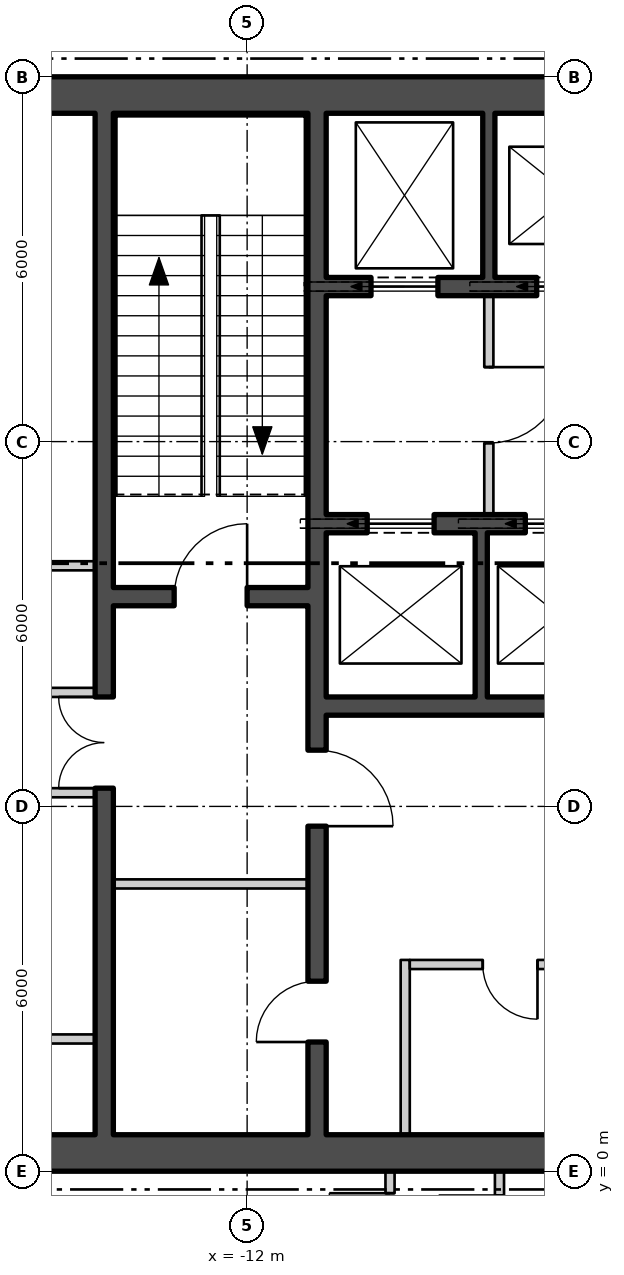
"""IFC4 building model, lengths in metres.
Left out: names, types, materials, properties, quantities, classifications, styles, units other than length and angle.
Written with IfcOpenShell. Run it as: python <this file> out.ifc"""

import sys

from ifc_helpers import new_model, si_unit, direction, frame, frame_2d, origin, place, context, subcontext, project, spatial, polyline, rectangle, outline, extrude, element, fill, save


model = new_model("IFC4")
c1 = context("Model", 3, precision=1e-05, world=origin(), true_north=direction((0.0, 1.0)))
c2 = subcontext(c1, "Body", "Model", "MODEL_VIEW")
j1 = project(units=[si_unit("LENGTHUNIT", "METRE"), si_unit("PLANEANGLEUNIT", "RADIAN")], contexts=[c1])
p1 = place(None, origin())
s1 = spatial("IfcSite", under=j1, at=p1, CompositionType="ELEMENT")
p2 = place(p1, origin())
s2 = spatial("IfcBuilding", under=s1, at=p2, CompositionType="ELEMENT")
p3 = place(p2, frame((0.0, 0.0, 46.8)))
s3 = spatial("IfcBuildingStorey", under=s2, at=p3, CompositionType="ELEMENT", Elevation=46.8)
p4 = place(p3, frame((-28.445, 10.319, -0.18), z_axis=(0.0, 0.0, 1.0), x_axis=(0.499999764979, -0.866025539474, 0.0)))
e1 = element("IfcWall", 1, at=p4, inside=s3, PredefinedType="SOLIDWALL", context=c2, shape_type="SweptSolid", body=[
    extrude(outline(polyline([(-0.13, -0.225), (45.87, -0.225), (45.61, 0.225), (0.13, 0.225), (-0.13, -0.225)])), origin(), (0.0, 0.0, 1.0), 4.28),
])
p5 = place(p4, frame((1.424, 0.0, 1.08)))
e2 = element("IfcOpeningElement", 2, at=p5, cuts=e1, PredefinedType="OPENING", context=c2, shape_type="SweptSolid", body=[
    extrude(rectangle(XDim=2.4, YDim=2.6, at=frame_2d((1.2, 1.3))), frame((0.0, 0.235, 0.0), z_axis=(0.0, -1.0, 0.0), x_axis=(1.0, 0.0, 0.0)), (0.0, 0.0, 1.0), 0.47),
])
p6 = place(p4, frame((5.893, 0.0, 1.08)))
e3 = element("IfcOpeningElement", 3, at=p6, cuts=e1, PredefinedType="OPENING", context=c2, shape_type="SweptSolid", body=[
    extrude(rectangle(XDim=2.4, YDim=2.6, at=frame_2d((1.2, 1.3))), frame((0.0, 0.235, 0.0), z_axis=(0.0, -1.0, 0.0), x_axis=(1.0, 0.0, 0.0)), (0.0, 0.0, 1.0), 0.47),
])
p7 = place(p4, frame((10.401, 0.0, 1.08)))
e4 = element("IfcOpeningElement", 4, at=p7, cuts=e1, PredefinedType="OPENING", context=c2, shape_type="SweptSolid", body=[
    extrude(rectangle(XDim=2.4, YDim=2.6, at=frame_2d((1.2, 1.3))), frame((0.0, 0.235, 0.0), z_axis=(0.0, -1.0, 0.0), x_axis=(1.0, 0.0, 0.0)), (0.0, 0.0, 1.0), 0.47),
])
p8 = place(p4, frame((14.909, 0.0, 1.08)))
e5 = element("IfcOpeningElement", 5, at=p8, cuts=e1, PredefinedType="OPENING", context=c2, shape_type="SweptSolid", body=[
    extrude(rectangle(XDim=2.4, YDim=2.6, at=frame_2d((1.2, 1.3))), frame((0.0, 0.235, 0.0), z_axis=(0.0, -1.0, 0.0), x_axis=(1.0, 0.0, 0.0)), (0.0, 0.0, 1.0), 0.47),
])
p9 = place(p4, frame((19.416, 0.0, 1.08)))
e6 = element("IfcOpeningElement", 6, at=p9, cuts=e1, PredefinedType="OPENING", context=c2, shape_type="SweptSolid", body=[
    extrude(rectangle(XDim=2.4, YDim=2.6, at=frame_2d((1.2, 1.3))), frame((0.0, 0.235, 0.0), z_axis=(0.0, -1.0, 0.0), x_axis=(1.0, 0.0, 0.0)), (0.0, 0.0, 1.0), 0.47),
])
p10 = place(p4, frame((23.924, 0.0, 1.08)))
e7 = element("IfcOpeningElement", 7, at=p10, cuts=e1, PredefinedType="OPENING", context=c2, shape_type="SweptSolid", body=[
    extrude(rectangle(XDim=2.4, YDim=2.6, at=frame_2d((1.2, 1.3))), frame((0.0, 0.235, 0.0), z_axis=(0.0, -1.0, 0.0), x_axis=(1.0, 0.0, 0.0)), (0.0, 0.0, 1.0), 0.47),
])
p11 = place(p4, frame((28.431, 0.0, 1.08)))
e8 = element("IfcOpeningElement", 8, at=p11, cuts=e1, PredefinedType="OPENING", context=c2, shape_type="SweptSolid", body=[
    extrude(rectangle(XDim=2.4, YDim=2.6, at=frame_2d((1.2, 1.3))), frame((0.0, 0.235, 0.0), z_axis=(0.0, -1.0, 0.0), x_axis=(1.0, 0.0, 0.0)), (0.0, 0.0, 1.0), 0.47),
])
p12 = place(p4, frame((32.939, 0.0, 1.08)))
e9 = element("IfcOpeningElement", 9, at=p12, cuts=e1, PredefinedType="OPENING", context=c2, shape_type="SweptSolid", body=[
    extrude(rectangle(XDim=2.4, YDim=2.6, at=frame_2d((1.2, 1.3))), frame((0.0, 0.235, 0.0), z_axis=(0.0, -1.0, 0.0), x_axis=(1.0, 0.0, 0.0)), (0.0, 0.0, 1.0), 0.47),
])
p13 = place(p4, frame((37.447, 0.0, 1.08)))
e10 = element("IfcOpeningElement", 10, at=p13, cuts=e1, PredefinedType="OPENING", context=c2, shape_type="SweptSolid", body=[
    extrude(rectangle(XDim=2.4, YDim=2.6, at=frame_2d((1.2, 1.3))), frame((0.0, 0.235, 0.0), z_axis=(0.0, -1.0, 0.0), x_axis=(1.0, 0.0, 0.0)), (0.0, 0.0, 1.0), 0.47),
])
p14 = place(p4, frame((41.916, 0.0, 1.08)))
e11 = element("IfcOpeningElement", 11, at=p14, cuts=e1, PredefinedType="OPENING", context=c2, shape_type="SweptSolid", body=[
    extrude(rectangle(XDim=2.4, YDim=2.6, at=frame_2d((1.2, 1.3))), frame((0.0, 0.235, 0.0), z_axis=(0.0, -1.0, 0.0), x_axis=(1.0, 0.0, 0.0)), (0.0, 0.0, 1.0), 0.47),
])
p15 = place(p3, frame((-17.5, 0.3, 0.0), z_axis=(0.0, 0.0, 1.0), x_axis=(1.0, 0.0, 0.0)))
e12 = element("IfcWall", 12, at=p15, inside=s3, PredefinedType="SHEAR", context=c2, shape_type="SweptSolid", body=[
    extrude(rectangle(XDim=35.0, YDim=0.6, at=frame_2d((17.5, 0.0))), origin(), (0.0, 0.0, 1.0), 4.3),
])
p16 = place(p15, frame((12.0, 0.0, 0.0)))
e13 = element("IfcOpeningElement", 13, at=p16, cuts=e12, PredefinedType="OPENING", context=c2, shape_type="SweptSolid", body=[
    extrude(rectangle(XDim=1.8, YDim=2.4, at=frame_2d((0.9, 1.2))), frame((0.0, 0.31, 0.0), z_axis=(0.0, -1.0, 0.0), x_axis=(1.0, 0.0, 0.0)), (0.0, 0.0, 1.0), 0.62),
])
p17 = place(p15, frame((22.0, 0.0, 0.0)))
e14 = element("IfcOpeningElement", 14, at=p17, cuts=e12, PredefinedType="OPENING", context=c2, shape_type="SweptSolid", body=[
    extrude(rectangle(XDim=1.8, YDim=2.4, at=frame_2d((0.9, 1.2))), frame((0.0, 0.31, 0.0), z_axis=(0.0, -1.0, 0.0), x_axis=(1.0, 0.0, 0.0)), (0.0, 0.0, 1.0), 0.62),
])
p18 = place(p3, frame((-17.5, 17.7, 0.0), z_axis=(0.0, 0.0, 1.0), x_axis=(1.0, 0.0, 0.0)))
e15 = element("IfcWall", 15, at=p18, inside=s3, PredefinedType="SHEAR", context=c2, shape_type="SweptSolid", body=[
    extrude(rectangle(XDim=35.0, YDim=0.6, at=frame_2d((17.5, 0.0))), origin(), (0.0, 0.0, 1.0), 4.3),
])
p19 = place(p3, frame((-10.85, 0.6, 0.0), z_axis=(0.0, 0.0, 1.0), x_axis=(0.0, 1.0, 0.0)))
e16 = element("IfcWall", 16, at=p19, inside=s3, PredefinedType="SHEAR", context=c2, shape_type="SweptSolid", body=[
    extrude(rectangle(XDim=16.8, YDim=0.3, at=frame_2d((8.4, 0.0))), origin(), (0.0, 0.0, 1.0), 4.3),
])
p20 = place(p19, frame((5.075, 0.0, 0.0)))
e17 = element("IfcOpeningElement", 17, at=p20, cuts=e16, PredefinedType="OPENING", context=c2, shape_type="SweptSolid", body=[
    extrude(rectangle(XDim=1.25, YDim=2.1, at=frame_2d((0.625, 1.05))), frame((0.0, 0.16, 0.0), z_axis=(0.0, -1.0, 0.0), x_axis=(1.0, 0.0, 0.0)), (0.0, 0.0, 1.0), 0.32),
])
p21 = place(p19, frame((1.525, 0.0, 0.0)))
e18 = element("IfcOpeningElement", 18, at=p21, cuts=e16, PredefinedType="OPENING", context=c2, shape_type="SweptSolid", body=[
    extrude(rectangle(XDim=1.0, YDim=2.1, at=frame_2d((0.5, 1.05))), frame((0.0, 0.16, 0.0), z_axis=(0.0, -1.0, 0.0), x_axis=(1.0, 0.0, 0.0)), (0.0, 0.0, 1.0), 0.32),
])
p22 = place(p3, frame((-14.35, 0.6, 0.0), z_axis=(0.0, 0.0, 1.0), x_axis=(0.0, 1.0, 0.0)))
e19 = element("IfcWall", 19, at=p22, inside=s3, PredefinedType="SHEAR", context=c2, shape_type="SweptSolid", body=[
    extrude(rectangle(XDim=16.8, YDim=0.3, at=frame_2d((8.4, 0.0))), origin(), (0.0, 0.0, 1.0), 4.3),
])
p23 = place(p22, frame((5.7, 0.0, 0.0)))
e20 = element("IfcOpeningElement", 20, at=p23, cuts=e19, PredefinedType="OPENING", context=c2, shape_type="SweptSolid", body=[
    extrude(rectangle(XDim=1.5, YDim=2.1, at=frame_2d((0.75, 1.05))), frame((0.0, 0.16, 0.0), z_axis=(0.0, -1.0, 0.0), x_axis=(1.0, 0.0, 0.0)), (0.0, 0.0, 1.0), 0.32),
])
p24 = place(p3, frame((-14.2, 9.45, 0.0), z_axis=(0.0, 0.0, 1.0), x_axis=(1.0, 0.0, 0.0)))
e21 = element("IfcWall", 21, at=p24, inside=s3, PredefinedType="SHEAR", context=c2, shape_type="SweptSolid", body=[
    extrude(rectangle(XDim=3.2, YDim=0.3, at=frame_2d((1.6, 0.0))), origin(), (0.0, 0.0, 1.0), 4.3),
])
p25 = place(p24, frame((1.0, 0.0, 0.0)))
e22 = element("IfcOpeningElement", 22, at=p25, cuts=e21, PredefinedType="OPENING", context=c2, shape_type="SweptSolid", body=[
    extrude(rectangle(XDim=1.2, YDim=2.1, at=frame_2d((0.6, 1.05))), frame((0.0, 0.16, 0.0), z_axis=(0.0, -1.0, 0.0), x_axis=(1.0, 0.0, 0.0)), (0.0, 0.0, 1.0), 0.32),
])
p26 = place(p3, frame((-10.7, 14.55, 0.0), z_axis=(0.0, 0.0, 1.0), x_axis=(1.0, 0.0, 0.0)))
e23 = element("IfcWall", 23, at=p26, inside=s3, PredefinedType="SHEAR", context=c2, shape_type="SweptSolid", body=[
    extrude(rectangle(XDim=21.4, YDim=0.3, at=frame_2d((10.7, 0.0))), origin(), (0.0, 0.0, 1.0), 4.3),
])
p27 = place(p26, frame((0.738, 0.0, 0.0)))
e24 = element("IfcOpeningElement", 24, at=p27, cuts=e23, PredefinedType="OPENING", context=c2, shape_type="SweptSolid", body=[
    extrude(rectangle(XDim=1.1, YDim=2.1, at=frame_2d((0.55, 1.05))), frame((0.0, 0.16, 0.0), z_axis=(0.0, -1.0, 0.0), x_axis=(1.0, 0.0, 0.0)), (0.0, 0.0, 1.0), 0.32),
])
p28 = place(p26, frame((3.462, 0.0, 0.0)))
e25 = element("IfcOpeningElement", 25, at=p28, cuts=e23, PredefinedType="OPENING", context=c2, shape_type="SweptSolid", body=[
    extrude(rectangle(XDim=1.1, YDim=2.1, at=frame_2d((0.55, 1.05))), frame((0.0, 0.16, 0.0), z_axis=(0.0, -1.0, 0.0), x_axis=(1.0, 0.0, 0.0)), (0.0, 0.0, 1.0), 0.32),
])
p29 = place(p26, frame((6.138, 0.0, 0.0)))
e26 = element("IfcOpeningElement", 26, at=p29, cuts=e23, PredefinedType="OPENING", context=c2, shape_type="SweptSolid", body=[
    extrude(rectangle(XDim=1.1, YDim=2.1, at=frame_2d((0.55, 1.05))), frame((0.0, 0.16, 0.0), z_axis=(0.0, -1.0, 0.0), x_axis=(1.0, 0.0, 0.0)), (0.0, 0.0, 1.0), 0.32),
])
p30 = place(p26, frame((8.812, 0.0, 0.0)))
e27 = element("IfcOpeningElement", 27, at=p30, cuts=e23, PredefinedType="OPENING", context=c2, shape_type="SweptSolid", body=[
    extrude(rectangle(XDim=1.1, YDim=2.1, at=frame_2d((0.55, 1.05))), frame((0.0, 0.16, 0.0), z_axis=(0.0, -1.0, 0.0), x_axis=(1.0, 0.0, 0.0)), (0.0, 0.0, 1.0), 0.32),
])
p31 = place(p26, frame((14.162, 0.0, 0.0)))
e28 = element("IfcOpeningElement", 28, at=p31, cuts=e23, PredefinedType="OPENING", context=c2, shape_type="SweptSolid", body=[
    extrude(rectangle(XDim=1.1, YDim=2.1, at=frame_2d((0.55, 1.05))), frame((0.0, 0.16, 0.0), z_axis=(0.0, -1.0, 0.0), x_axis=(1.0, 0.0, 0.0)), (0.0, 0.0, 1.0), 0.32),
])
p32 = place(p26, frame((16.837, 0.0, 0.0)))
e29 = element("IfcOpeningElement", 29, at=p32, cuts=e23, PredefinedType="OPENING", context=c2, shape_type="SweptSolid", body=[
    extrude(rectangle(XDim=1.1, YDim=2.1, at=frame_2d((0.55, 1.05))), frame((0.0, 0.16, 0.0), z_axis=(0.0, -1.0, 0.0), x_axis=(1.0, 0.0, 0.0)), (0.0, 0.0, 1.0), 0.32),
])
p33 = place(p26, frame((19.562, 0.0, 0.0)))
e30 = element("IfcOpeningElement", 30, at=p33, cuts=e23, PredefinedType="OPENING", context=c2, shape_type="SweptSolid", body=[
    extrude(rectangle(XDim=1.1, YDim=2.1, at=frame_2d((0.55, 1.05))), frame((0.0, 0.16, 0.0), z_axis=(0.0, -1.0, 0.0), x_axis=(1.0, 0.0, 0.0)), (0.0, 0.0, 1.0), 0.32),
])
p34 = place(p3, frame((-10.7, 10.65, 0.0), z_axis=(0.0, 0.0, 1.0), x_axis=(1.0, 0.0, 0.0)))
e31 = element("IfcWall", 31, at=p34, inside=s3, PredefinedType="SHEAR", context=c2, shape_type="SweptSolid", body=[
    extrude(rectangle(XDim=10.3, YDim=0.3, at=frame_2d((5.15, 0.0))), origin(), (0.0, 0.0, 1.0), 4.3),
])
p35 = place(p34, frame((0.675, 0.0, 0.0)))
e32 = element("IfcOpeningElement", 32, at=p35, cuts=e31, PredefinedType="OPENING", context=c2, shape_type="SweptSolid", body=[
    extrude(rectangle(XDim=1.1, YDim=2.1, at=frame_2d((0.55, 1.05))), frame((0.0, 0.16, 0.0), z_axis=(0.0, -1.0, 0.0), x_axis=(1.0, 0.0, 0.0)), (0.0, 0.0, 1.0), 0.32),
])
p36 = place(p34, frame((3.275, 0.0, 0.0)))
e33 = element("IfcOpeningElement", 33, at=p36, cuts=e31, PredefinedType="OPENING", context=c2, shape_type="SweptSolid", body=[
    extrude(rectangle(XDim=1.1, YDim=2.1, at=frame_2d((0.55, 1.05))), frame((0.0, 0.16, 0.0), z_axis=(0.0, -1.0, 0.0), x_axis=(1.0, 0.0, 0.0)), (0.0, 0.0, 1.0), 0.32),
])
p37 = place(p34, frame((5.825, 0.0, 0.0)))
e34 = element("IfcOpeningElement", 34, at=p37, cuts=e31, PredefinedType="OPENING", context=c2, shape_type="SweptSolid", body=[
    extrude(rectangle(XDim=1.1, YDim=2.1, at=frame_2d((0.55, 1.05))), frame((0.0, 0.16, 0.0), z_axis=(0.0, -1.0, 0.0), x_axis=(1.0, 0.0, 0.0)), (0.0, 0.0, 1.0), 0.32),
])
p38 = place(p34, frame((8.375, 0.0, 0.0)))
e35 = element("IfcOpeningElement", 35, at=p38, cuts=e31, PredefinedType="OPENING", context=c2, shape_type="SweptSolid", body=[
    extrude(rectangle(XDim=1.1, YDim=2.1, at=frame_2d((0.55, 1.05))), frame((0.0, 0.16, 0.0), z_axis=(0.0, -1.0, 0.0), x_axis=(1.0, 0.0, 0.0)), (0.0, 0.0, 1.0), 0.32),
])
p39 = place(p3, frame((-10.7, 7.65, 0.0), z_axis=(0.0, 0.0, 1.0), x_axis=(1.0, 0.0, 0.0)))
e36 = element("IfcWall", 36, at=p39, inside=s3, PredefinedType="SHEAR", context=c2, shape_type="SweptSolid", body=[
    extrude(rectangle(XDim=10.3, YDim=0.3, at=frame_2d((5.15, 0.0))), origin(), (0.0, 0.0, 1.0), 4.3),
])
for number, where, z_axis, x_axis in (
    (37, (-8.025, 14.7, 0.0), (0.0, 0.0, 1.0), (0.0, 1.0, 0.0)),
    (38, (-8.15, 7.8, 0.0), (0.0, 0.0, 1.0), (0.0, 1.0, 0.0)),
):
    element("IfcWall", number, at=place(p3, frame(where, z_axis=z_axis, x_axis=x_axis)), inside=s3, PredefinedType="SHEAR", context=c2, shape_type="SweptSolid", body=[
        extrude(rectangle(XDim=2.7, YDim=0.2, at=frame_2d((1.35, 0.0))), origin(), (0.0, 0.0, 1.0), 4.3),
    ])
p40 = place(p3, frame((-8.025, 10.8, 0.0), z_axis=(0.0, 0.0, 1.0), x_axis=(0.0, 1.0, 0.0)))
e39 = element("IfcWall", 39, at=p40, inside=s3, PredefinedType="PARTITIONING", context=c2, shape_type="SweptSolid", body=[
    extrude(rectangle(XDim=3.6, YDim=0.15, at=frame_2d((1.8, 0.0))), origin(), (0.0, 0.0, 1.0), 4.3),
])
p41 = place(p40, frame((1.175, 0.0, 0.0)))
e40 = element("IfcOpeningElement", 40, at=p41, cuts=e39, PredefinedType="OPENING", context=c2, shape_type="SweptSolid", body=[
    extrude(rectangle(XDim=1.25, YDim=2.1, at=frame_2d((0.625, 1.05))), frame((0.0, 0.085, 0.0), z_axis=(0.0, -1.0, 0.0), x_axis=(1.0, 0.0, 0.0)), (0.0, 0.0, 1.0), 0.17),
])
p42 = place(p3, frame((-14.2, 4.725, 0.0), z_axis=(0.0, 0.0, 1.0), x_axis=(1.0, 0.0, 0.0)))
e41 = element("IfcWall", 41, at=p42, inside=s3, PredefinedType="PARTITIONING", context=c2, shape_type="SweptSolid", body=[
    extrude(rectangle(XDim=3.2, YDim=0.15, at=frame_2d((1.6, 0.0))), origin(), (0.0, 0.0, 1.0), 4.3),
])
for number, where, z_axis, x_axis in (
    (42, (-16.9, 6.225, 0.0), (0.0, 0.0, 1.0), (1.0, 0.0, 0.0)),
    (43, (-16.9, 7.875, 0.0), (0.0, 0.0, 1.0), (1.0, 0.0, 0.0)),
    (44, (-16.9, 2.175, 0.0), (0.0, 0.0, 1.0), (1.0, 0.0, 0.0)),
    (45, (-16.9, 9.957, 0.0), (0.0, 0.0, 1.0), (1.0, 0.0, 0.0)),
):
    element("IfcWall", number, at=place(p3, frame(where, z_axis=z_axis, x_axis=x_axis)), inside=s3, PredefinedType="PARTITIONING", context=c2, shape_type="SweptSolid", body=[
        extrude(rectangle(XDim=2.4, YDim=0.15, at=frame_2d((1.2, 0.0))), origin(), (0.0, 0.0, 1.0), 4.3),
    ])
p43 = place(p3, frame((-9.4, 0.6, 0.0), z_axis=(0.0, 0.0, 1.0), x_axis=(0.0, 1.0, 0.0)))
e46 = element("IfcWall", 46, at=p43, inside=s3, PredefinedType="PARTITIONING", context=c2, shape_type="SweptSolid", body=[
    extrude(rectangle(XDim=2.875, YDim=0.15, at=frame_2d((1.438, 0.0))), origin(), (0.0, 0.0, 1.0), 4.3),
])
p44 = place(p3, frame((-9.325, 3.4, 0.0), z_axis=(0.0, 0.0, 1.0), x_axis=(1.0, 0.0, 0.0)))
e47 = element("IfcWall", 47, at=p44, inside=s3, PredefinedType="PARTITIONING", context=c2, shape_type="SweptSolid", body=[
    extrude(rectangle(XDim=3.3, YDim=0.15, at=frame_2d((1.65, 0.0))), origin(), (0.0, 0.0, 1.0), 4.3),
])
p45 = place(p44, frame((1.2, 0.0, 0.0)))
e48 = element("IfcOpeningElement", 48, at=p45, cuts=e47, PredefinedType="OPENING", context=c2, shape_type="SweptSolid", body=[
    extrude(rectangle(XDim=0.9, YDim=2.1, at=frame_2d((0.45, 1.05))), frame((0.0, 0.085, 0.0), z_axis=(0.0, -1.0, 0.0), x_axis=(1.0, 0.0, 0.0)), (0.0, 0.0, 1.0), 0.17),
])
p46 = place(p3, frame((-9.65, -1.725, 0.0), z_axis=(0.0, 0.0, 1.0), x_axis=(0.0, 1.0, 0.0)))
e49 = element("IfcWall", 49, at=p46, inside=s3, PredefinedType="PARTITIONING", context=c2, shape_type="SweptSolid", body=[
    extrude(rectangle(XDim=1.725, YDim=0.15, at=frame_2d((0.863, 0.0))), origin(), (0.0, 0.0, 1.0), 3.7),
])
p47 = place(p46, frame((0.363, 0.0, 0.0)))
e50 = element("IfcOpeningElement", 50, at=p47, cuts=e49, PredefinedType="OPENING", context=c2, shape_type="SweptSolid", body=[
    extrude(rectangle(XDim=1.0, YDim=2.1, at=frame_2d((0.5, 1.05))), frame((0.0, 0.085, 0.0), z_axis=(0.0, -1.0, 0.0), x_axis=(1.0, 0.0, 0.0)), (0.0, 0.0, 1.0), 0.17),
])
p48 = place(p3, frame((-7.85, -1.8, 0.0), z_axis=(0.0, 0.0, 1.0), x_axis=(0.0, 1.0, 0.0)))
e51 = element("IfcWall", 51, at=p48, inside=s3, PredefinedType="PARTITIONING", context=c2, shape_type="SweptSolid", body=[
    extrude(rectangle(XDim=1.8, YDim=0.15, at=frame_2d((0.9, 0.0))), origin(), (0.0, 0.0, 1.0), 4.3),
])
p49 = place(p48, frame((0.4, 0.0, 0.0)))
e52 = element("IfcOpeningElement", 52, at=p49, cuts=e51, PredefinedType="OPENING", context=c2, shape_type="SweptSolid", body=[
    extrude(rectangle(XDim=1.0, YDim=2.1, at=frame_2d((0.5, 1.05))), frame((0.0, 0.085, 0.0), z_axis=(0.0, -1.0, 0.0), x_axis=(1.0, 0.0, 0.0)), (0.0, 0.0, 1.0), 0.17),
])
p50 = place(p27, origin())
e53 = element("IfcDoor", 53, at=p50, inside=s3, OperationType="SLIDING_TO_LEFT", PredefinedType="DOOR", context=c2, shape_type="SweptSolid", body=[
    extrude(rectangle(XDim=1.1, YDim=2.1, at=frame_2d((0.55, 1.05))), frame((0.0, 0.025, 0.0), z_axis=(0.0, -1.0, 0.0), x_axis=(1.0, 0.0, 0.0)), (0.0, 0.0, 1.0), 0.05),
])
fill(e24, e53)
p51 = place(p28, origin())
e54 = element("IfcDoor", 54, at=p51, inside=s3, OperationType="SLIDING_TO_LEFT", PredefinedType="DOOR", context=c2, shape_type="SweptSolid", body=[
    extrude(rectangle(XDim=1.1, YDim=2.1, at=frame_2d((0.55, 1.05))), frame((0.0, 0.025, 0.0), z_axis=(0.0, -1.0, 0.0), x_axis=(1.0, 0.0, 0.0)), (0.0, 0.0, 1.0), 0.05),
])
fill(e25, e54)
p52 = place(p35, origin())
e55 = element("IfcDoor", 55, at=p52, inside=s3, OperationType="SLIDING_TO_LEFT", PredefinedType="DOOR", context=c2, shape_type="SweptSolid", body=[
    extrude(rectangle(XDim=1.1, YDim=2.1, at=frame_2d((0.55, 1.05))), frame((0.0, 0.025, 0.0), z_axis=(0.0, -1.0, 0.0), x_axis=(1.0, 0.0, 0.0)), (0.0, 0.0, 1.0), 0.05),
])
fill(e32, e55)
p53 = place(p36, origin())
e56 = element("IfcDoor", 56, at=p53, inside=s3, OperationType="SLIDING_TO_LEFT", PredefinedType="DOOR", context=c2, shape_type="SweptSolid", body=[
    extrude(rectangle(XDim=1.1, YDim=2.1, at=frame_2d((0.55, 1.05))), frame((0.0, 0.025, 0.0), z_axis=(0.0, -1.0, 0.0), x_axis=(1.0, 0.0, 0.0)), (0.0, 0.0, 1.0), 0.05),
])
fill(e33, e56)
p54 = place(p41, origin())
e57 = element("IfcDoor", 57, at=p54, inside=s3, OperationType="SINGLE_SWING_RIGHT", PredefinedType="DOOR", context=c2, shape_type="SweptSolid", body=[
    extrude(rectangle(XDim=1.25, YDim=2.1, at=frame_2d((0.625, 1.05))), frame((0.0, 0.025, 0.0), z_axis=(0.0, -1.0, 0.0), x_axis=(1.0, 0.0, 0.0)), (0.0, 0.0, 1.0), 0.05),
])
fill(e40, e57)
p55 = place(p25, origin())
e58 = element("IfcDoor", 58, at=p55, inside=s3, OperationType="SINGLE_SWING_LEFT", PredefinedType="DOOR", context=c2, shape_type="SweptSolid", body=[
    extrude(rectangle(XDim=1.2, YDim=2.1, at=frame_2d((0.6, 1.05))), frame((0.0, 0.025, 0.0), z_axis=(0.0, -1.0, 0.0), x_axis=(1.0, 0.0, 0.0)), (0.0, 0.0, 1.0), 0.05),
])
fill(e22, e58)
p56 = place(p20, origin())
e59 = element("IfcDoor", 59, at=p56, inside=s3, OperationType="SINGLE_SWING_LEFT", PredefinedType="DOOR", context=c2, shape_type="SweptSolid", body=[
    extrude(rectangle(XDim=1.25, YDim=2.1, at=frame_2d((0.625, 1.05))), frame((0.0, 0.025, 0.0), z_axis=(0.0, -1.0, 0.0), x_axis=(1.0, 0.0, 0.0)), (0.0, 0.0, 1.0), 0.05),
])
fill(e17, e59)
p57 = place(p21, origin())
e60 = element("IfcDoor", 60, at=p57, inside=s3, OperationType="SINGLE_SWING_RIGHT", PredefinedType="DOOR", context=c2, shape_type="SweptSolid", body=[
    extrude(rectangle(XDim=1.0, YDim=2.1, at=frame_2d((0.5, 1.05))), frame((0.0, 0.025, 0.0), z_axis=(0.0, -1.0, 0.0), x_axis=(1.0, 0.0, 0.0)), (0.0, 0.0, 1.0), 0.05),
])
fill(e18, e60)
p58 = place(p23, origin())
e61 = element("IfcDoor", 61, at=p58, inside=s3, OperationType="DOUBLE_DOOR_SINGLE_SWING", PredefinedType="DOOR", context=c2, shape_type="SweptSolid", body=[
    extrude(rectangle(XDim=1.5, YDim=2.1, at=frame_2d((0.75, 1.05))), frame((0.0, 0.025, 0.0), z_axis=(0.0, -1.0, 0.0), x_axis=(1.0, 0.0, 0.0)), (0.0, 0.0, 1.0), 0.05),
])
fill(e20, e61)
p59 = place(p45, origin())
e62 = element("IfcDoor", 62, at=p59, inside=s3, OperationType="SINGLE_SWING_RIGHT", PredefinedType="DOOR", context=c2, shape_type="SweptSolid", body=[
    extrude(rectangle(XDim=0.9, YDim=2.1, at=frame_2d((0.45, 1.05))), frame((0.0, 0.025, 0.0), z_axis=(0.0, -1.0, 0.0), x_axis=(1.0, 0.0, 0.0)), (0.0, 0.0, 1.0), 0.05),
])
fill(e48, e62)
p60 = place(p47, origin())
e63 = element("IfcDoor", 63, at=p60, inside=s3, OperationType="SINGLE_SWING_LEFT", PredefinedType="DOOR", context=c2, shape_type="SweptSolid", body=[
    extrude(rectangle(XDim=1.0, YDim=2.1, at=frame_2d((0.5, 1.05))), frame((0.0, 0.025, 0.0), z_axis=(0.0, -1.0, 0.0), x_axis=(1.0, 0.0, 0.0)), (0.0, 0.0, 1.0), 0.05),
])
fill(e50, e63)
p61 = place(p49, origin())
e64 = element("IfcDoor", 64, at=p61, inside=s3, OperationType="SINGLE_SWING_LEFT", PredefinedType="DOOR", context=c2, shape_type="SweptSolid", body=[
    extrude(rectangle(XDim=1.0, YDim=2.1, at=frame_2d((0.5, 1.05))), frame((0.0, 0.025, 0.0), z_axis=(0.0, -1.0, 0.0), x_axis=(1.0, 0.0, 0.0)), (0.0, 0.0, 1.0), 0.05),
])
fill(e52, e64)
save(model, sys.argv[1])
